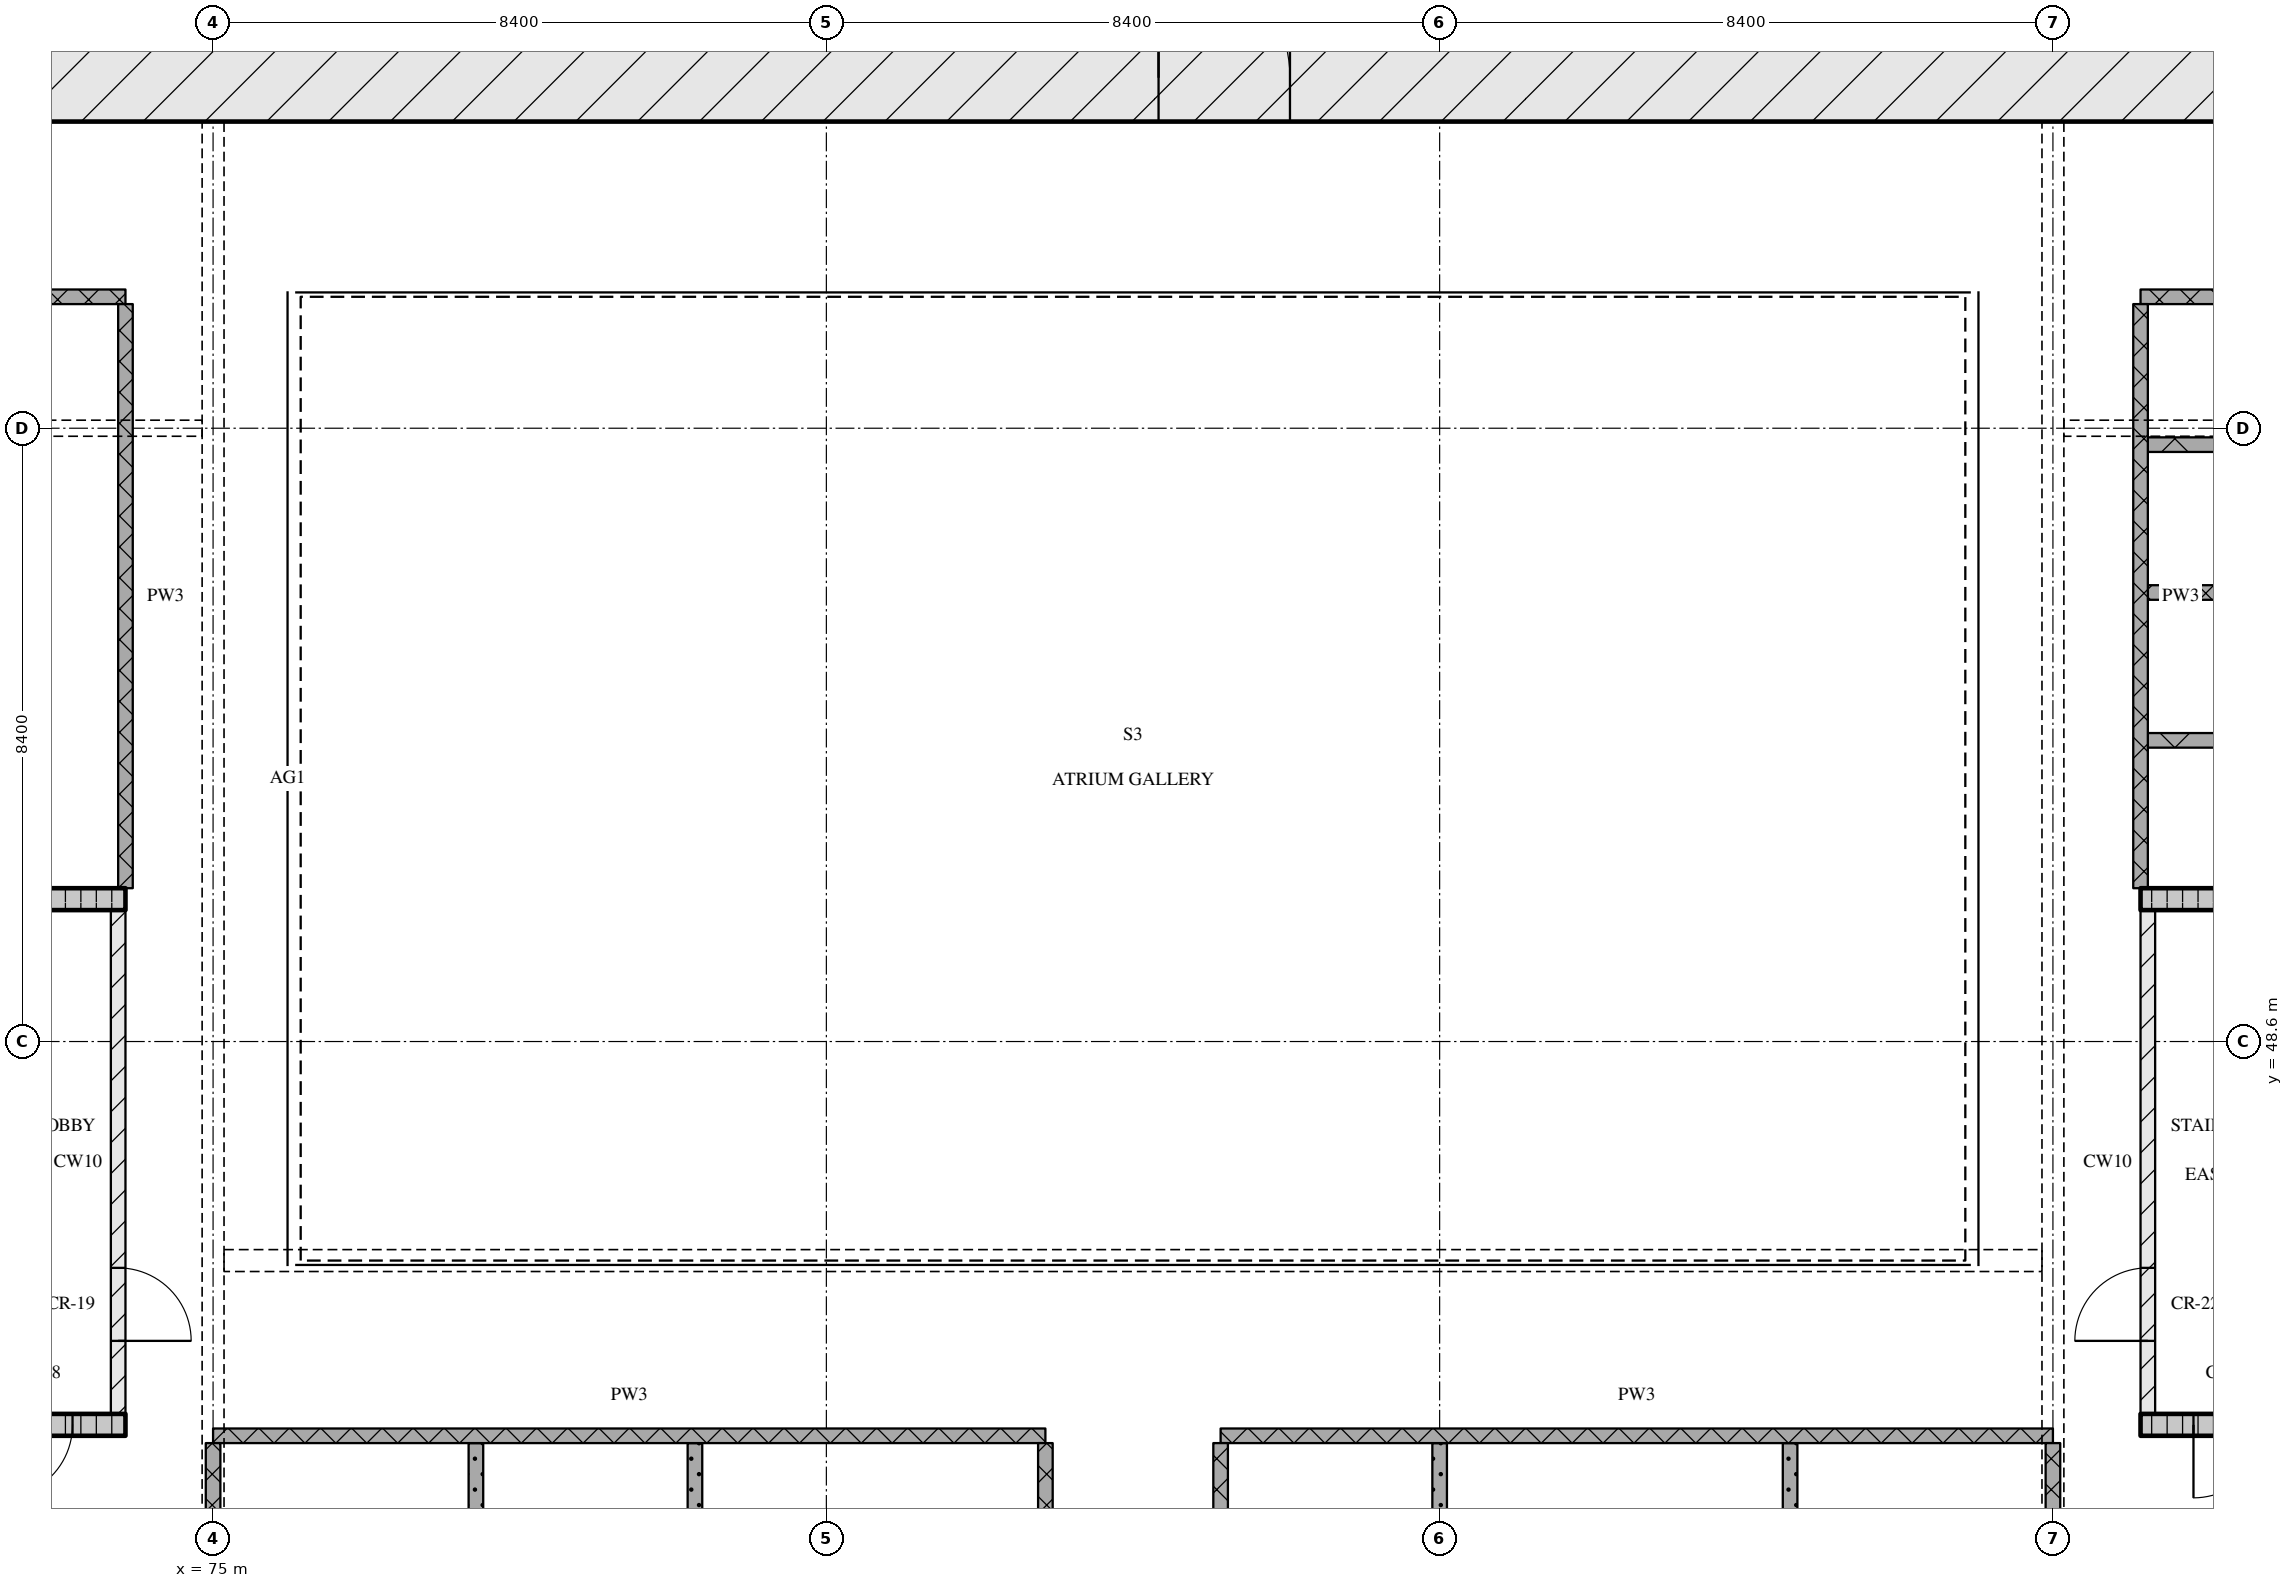
"""IFC4 building model, lengths in metres.
Left out: names, types, materials, properties, quantities, classifications, styles, units other than length and angle.
Written with IfcOpenShell. Run it as: python <this file> out.ifc"""

import sys

from ifc_helpers import new_model, si_unit, direction, frame, frame_2d, origin, place, context, subcontext, project, spatial, rectangle, extrude, element, fill, save


model = new_model("IFC4")
c1 = context("Model", 3, precision=1e-05, world=origin(), true_north=direction((0.0, 1.0)))
c2 = subcontext(c1, "Body", "Model", "MODEL_VIEW")
j1 = project(units=[si_unit("LENGTHUNIT", "METRE"), si_unit("PLANEANGLEUNIT", "RADIAN")], contexts=[c1])
p1 = place(None, origin())
s1 = spatial("IfcSite", under=j1, at=p1, CompositionType="ELEMENT")
p2 = place(p1, origin())
s2 = spatial("IfcBuilding", under=s1, at=p2, CompositionType="ELEMENT")
p3 = place(p2, frame((0.0, 0.0, 32.7)))
s3 = spatial("IfcBuildingStorey", under=s2, at=p3, CompositionType="ELEMENT", Elevation=32.7)
p4 = place(p3, frame((66.6, 61.8, 0.0), z_axis=(0.0, 0.0, 1.0), x_axis=(1.0, 0.0, 0.0)))
e1 = element("IfcWall", 1, at=p4, inside=s3, PredefinedType="SOLIDWALL", context=c2, shape_type="SweptSolid", body=[
    extrude(rectangle(XDim=42.0, YDim=1.2, at=frame_2d((21.0, 0.0))), origin(), (0.0, 0.0, 1.0), 4.22),
])
p5 = place(p4, frame((21.35, 0.0, 0.0)))
e2 = element("IfcOpeningElement", 2, at=p5, cuts=e1, PredefinedType="OPENING", context=c2, shape_type="SweptSolid", body=[
    extrude(rectangle(XDim=1.8, YDim=2.1, at=frame_2d((0.9, 1.05))), frame((0.0, 0.61, 0.0), z_axis=(0.0, -1.0, 0.0), x_axis=(1.0, 0.0, 0.0)), (0.0, 0.0, 1.0), 1.22),
])
p6 = place(p3, frame((68.2, 43.35, 0.0), z_axis=(0.0, 0.0, 1.0), x_axis=(1.0, 0.0, 0.0)))
e3 = element("IfcWall", 3, at=p6, inside=s3, PredefinedType="SOLIDWALL", context=c2, shape_type="SweptSolid", body=[
    extrude(rectangle(XDim=5.6, YDim=0.3, at=frame_2d((2.8, 0.0))), origin(), (0.0, 0.0, 1.0), 4.22),
])
p7 = place(p6, frame((3.875, 0.0, 0.0)))
e4 = element("IfcOpeningElement", 4, at=p7, cuts=e3, PredefinedType="OPENING", context=c2, shape_type="SweptSolid", body=[
    extrude(rectangle(XDim=1.0, YDim=2.1, at=frame_2d((0.5, 1.05))), frame((0.0, 0.16, 0.0), z_axis=(0.0, -1.0, 0.0), x_axis=(1.0, 0.0, 0.0)), (0.0, 0.0, 1.0), 0.32),
])
p8 = place(p3, frame((73.7, 43.5, 0.0), z_axis=(0.0, 0.0, 1.0), x_axis=(0.0, 1.0, 0.0)))
e5 = element("IfcWall", 5, at=p8, inside=s3, PredefinedType="PARTITIONING", context=c2, shape_type="SweptSolid", body=[
    extrude(rectangle(XDim=6.9, YDim=0.2, at=frame_2d((3.45, 0.0))), origin(), (0.0, 0.0, 1.0), 4.22),
])
p9 = place(p8, frame((1.0, 0.0, 0.0)))
e6 = element("IfcOpeningElement", 6, at=p9, cuts=e5, PredefinedType="OPENING", context=c2, shape_type="SweptSolid", body=[
    extrude(rectangle(XDim=1.0, YDim=2.1, at=frame_2d((0.5, 1.05))), frame((0.0, 0.11, 0.0), z_axis=(0.0, -1.0, 0.0), x_axis=(1.0, 0.0, 0.0)), (0.0, 0.0, 1.0), 0.22),
])
p10 = place(p3, frame((68.2, 50.55, 0.0), z_axis=(0.0, 0.0, 1.0), x_axis=(1.0, 0.0, 0.0)))
e7 = element("IfcWall", 7, at=p10, inside=s3, PredefinedType="SOLIDWALL", context=c2, shape_type="SweptSolid", body=[
    extrude(rectangle(XDim=5.6, YDim=0.3, at=frame_2d((2.8, 0.0))), origin(), (0.0, 0.0, 1.0), 4.22),
])
p11 = place(p3, frame((101.4, 43.35, 0.0), z_axis=(0.0, 0.0, 1.0), x_axis=(1.0, 0.0, 0.0)))
e8 = element("IfcWall", 8, at=p11, inside=s3, PredefinedType="SOLIDWALL", context=c2, shape_type="SweptSolid", body=[
    extrude(rectangle(XDim=5.6, YDim=0.3, at=frame_2d((2.8, 0.0))), origin(), (0.0, 0.0, 1.0), 4.22),
])
p12 = place(p11, frame((0.725, 0.0, 0.0)))
e9 = element("IfcOpeningElement", 9, at=p12, cuts=e8, PredefinedType="OPENING", context=c2, shape_type="SweptSolid", body=[
    extrude(rectangle(XDim=1.0, YDim=2.1, at=frame_2d((0.5, 1.05))), frame((0.0, 0.16, 0.0), z_axis=(0.0, -1.0, 0.0), x_axis=(1.0, 0.0, 0.0)), (0.0, 0.0, 1.0), 0.32),
])
p13 = place(p3, frame((101.5, 43.5, 0.0), z_axis=(0.0, 0.0, 1.0), x_axis=(0.0, 1.0, 0.0)))
e10 = element("IfcWall", 10, at=p13, inside=s3, PredefinedType="PARTITIONING", context=c2, shape_type="SweptSolid", body=[
    extrude(rectangle(XDim=6.9, YDim=0.2, at=frame_2d((3.45, 0.0))), origin(), (0.0, 0.0, 1.0), 4.22),
])
p14 = place(p13, frame((1.0, 0.0, 0.0)))
e11 = element("IfcOpeningElement", 11, at=p14, cuts=e10, PredefinedType="OPENING", context=c2, shape_type="SweptSolid", body=[
    extrude(rectangle(XDim=1.0, YDim=2.1, at=frame_2d((0.5, 1.05))), frame((0.0, 0.11, 0.0), z_axis=(0.0, -1.0, 0.0), x_axis=(1.0, 0.0, 0.0)), (0.0, 0.0, 1.0), 0.22),
])
p15 = place(p3, frame((101.4, 50.55, 0.0), z_axis=(0.0, 0.0, 1.0), x_axis=(1.0, 0.0, 0.0)))
e12 = element("IfcWall", 12, at=p15, inside=s3, PredefinedType="SOLIDWALL", context=c2, shape_type="SweptSolid", body=[
    extrude(rectangle(XDim=5.6, YDim=0.3, at=frame_2d((2.8, 0.0))), origin(), (0.0, 0.0, 1.0), 4.22),
])
for number, where, z_axis, x_axis in (
    (13, (75.0, 43.2, 0.0), (0.0, 0.0, 1.0), (1.0, 0.0, 0.0)),
    (14, (88.8, 43.2, 0.0), (0.0, 0.0, 1.0), (1.0, 0.0, 0.0)),
):
    element("IfcWall", number, at=place(p3, frame(where, z_axis=z_axis, x_axis=x_axis)), inside=s3, PredefinedType="PARTITIONING", context=c2, shape_type="SweptSolid", body=[
        extrude(rectangle(XDim=11.4, YDim=0.2, at=frame_2d((5.7, 0.0))), origin(), (0.0, 0.0, 1.0), 4.22),
    ])
for number, where, z_axis, x_axis in (
    (15, (101.5, 52.725, 0.0), (0.0, 0.0, 1.0), (1.0, 0.0, 0.0)),
    (16, (101.5, 54.75, 0.0), (0.0, 0.0, 1.0), (1.0, 0.0, 0.0)),
):
    element("IfcWall", number, at=place(p3, frame(where, z_axis=z_axis, x_axis=x_axis)), inside=s3, PredefinedType="PARTITIONING", context=c2, shape_type="SweptSolid", body=[
        extrude(rectangle(XDim=10.6, YDim=0.2, at=frame_2d((5.3, 0.0))), origin(), (0.0, 0.0, 1.0), 4.22),
    ])
p16 = place(p3, frame((101.5, 56.775, 0.0), z_axis=(0.0, 0.0, 1.0), x_axis=(1.0, 0.0, 0.0)))
e17 = element("IfcWall", 17, at=p16, inside=s3, PredefinedType="PARTITIONING", context=c2, shape_type="SweptSolid", body=[
    extrude(rectangle(XDim=6.63, YDim=0.2, at=frame_2d((3.315, 0.0))), origin(), (0.0, 0.0, 1.0), 4.22),
])
p17 = place(p3, frame((73.8, 58.8, 0.0), z_axis=(0.0, 0.0, 1.0), x_axis=(-1.0, 0.0, 0.0)))
e18 = element("IfcWall", 18, at=p17, inside=s3, PredefinedType="PARTITIONING", context=c2, shape_type="SweptSolid", body=[
    extrude(rectangle(XDim=10.8, YDim=0.2, at=frame_2d((5.4, 0.0))), origin(), (0.0, 0.0, 1.0), 4.22),
])
p18 = place(p17, frame((4.95, 0.0, 0.0)))
e19 = element("IfcOpeningElement", 19, at=p18, cuts=e18, PredefinedType="OPENING", context=c2, shape_type="SweptSolid", body=[
    extrude(rectangle(XDim=0.9, YDim=2.1, at=frame_2d((0.45, 1.05))), frame((0.0, 0.11, 0.0), z_axis=(0.0, -1.0, 0.0), x_axis=(1.0, 0.0, 0.0)), (0.0, 0.0, 1.0), 0.22),
])
p19 = place(p3, frame((101.4, 58.8, 0.0), z_axis=(0.0, 0.0, 1.0), x_axis=(1.0, 0.0, 0.0)))
e20 = element("IfcWall", 20, at=p19, inside=s3, PredefinedType="PARTITIONING", context=c2, shape_type="SweptSolid", body=[
    extrude(rectangle(XDim=10.8, YDim=0.2, at=frame_2d((5.4, 0.0))), origin(), (0.0, 0.0, 1.0), 4.22),
])
p20 = place(p3, frame((73.8, 58.7, 0.0), z_axis=(0.0, 0.0, 1.0), x_axis=(0.0, -1.0, 0.0)))
e21 = element("IfcWall", 21, at=p20, inside=s3, PredefinedType="PARTITIONING", context=c2, shape_type="SweptSolid", body=[
    extrude(rectangle(XDim=8.0, YDim=0.2, at=frame_2d((4.0, 0.0))), origin(), (0.0, 0.0, 1.0), 4.22),
])
p21 = place(p3, frame((75.0, 43.1, 0.0), z_axis=(0.0, 0.0, 1.0), x_axis=(0.0, -1.0, 0.0)))
e22 = element("IfcWall", 22, at=p21, inside=s3, PredefinedType="PARTITIONING", context=c2, shape_type="SweptSolid", body=[
    extrude(rectangle(XDim=2.2, YDim=0.2, at=frame_2d((1.1, 0.0))), origin(), (0.0, 0.0, 1.0), 3.33),
])
for number, where, z_axis, x_axis in (
    (23, (78.6, 43.1, 0.0), (0.0, 0.0, 1.0), (0.0, -1.0, 0.0)),
    (24, (81.6, 43.1, 0.0), (0.0, 0.0, 1.0), (0.0, -1.0, 0.0)),
    (25, (86.4, 43.1, 0.0), (0.0, 0.0, 1.0), (0.0, -1.0, 0.0)),
):
    element("IfcWall", number, at=place(p3, frame(where, z_axis=z_axis, x_axis=x_axis)), inside=s3, PredefinedType="PARTITIONING", context=c2, shape_type="SweptSolid", body=[
        extrude(rectangle(XDim=4.6, YDim=0.2, at=frame_2d((2.3, 0.0))), origin(), (0.0, 0.0, 1.0), 4.22),
    ])
p22 = place(p3, frame((88.8, 43.1, 0.0), z_axis=(0.0, 0.0, 1.0), x_axis=(0.0, -1.0, 0.0)))
e26 = element("IfcWall", 26, at=p22, inside=s3, PredefinedType="PARTITIONING", context=c2, shape_type="SweptSolid", body=[
    extrude(rectangle(XDim=4.6, YDim=0.2, at=frame_2d((2.3, 0.0))), origin(), (0.0, 0.0, 1.0), 4.22),
])
p23 = place(p22, frame((1.85, 0.0, 0.0)))
e27 = element("IfcOpeningElement", 27, at=p23, cuts=e26, PredefinedType="OPENING", context=c2, shape_type="SweptSolid", body=[
    extrude(rectangle(XDim=0.9, YDim=2.1, at=frame_2d((0.45, 1.05))), frame((0.0, 0.11, 0.0), z_axis=(0.0, -1.0, 0.0), x_axis=(1.0, 0.0, 0.0)), (0.0, 0.0, 1.0), 0.22),
])
p24 = place(p3, frame((91.8, 43.1, 0.0), z_axis=(0.0, 0.0, 1.0), x_axis=(0.0, -1.0, 0.0)))
e28 = element("IfcWall", 28, at=p24, inside=s3, PredefinedType="PARTITIONING", context=c2, shape_type="SweptSolid", body=[
    extrude(rectangle(XDim=2.43, YDim=0.2, at=frame_2d((1.215, 0.0))), origin(), (0.0, 0.0, 1.0), 4.22),
])
p25 = place(p3, frame((96.6, 43.1, 0.0), z_axis=(0.0, 0.0, 1.0), x_axis=(0.0, -1.0, 0.0)))
e29 = element("IfcWall", 29, at=p25, inside=s3, PredefinedType="PARTITIONING", context=c2, shape_type="SweptSolid", body=[
    extrude(rectangle(XDim=4.6, YDim=0.2, at=frame_2d((2.3, 0.0))), origin(), (0.0, 0.0, 1.0), 4.22),
])
p26 = place(p3, frame((100.2, 43.1, 0.0), z_axis=(0.0, 0.0, 1.0), x_axis=(0.0, -1.0, 0.0)))
e30 = element("IfcWall", 30, at=p26, inside=s3, PredefinedType="PARTITIONING", context=c2, shape_type="SweptSolid", body=[
    extrude(rectangle(XDim=2.2, YDim=0.2, at=frame_2d((1.1, 0.0))), origin(), (0.0, 0.0, 1.0), 3.33),
])
p27 = place(p3, frame((101.4, 58.7, 0.0), z_axis=(0.0, 0.0, 1.0), x_axis=(0.0, -1.0, 0.0)))
e31 = element("IfcWall", 31, at=p27, inside=s3, PredefinedType="PARTITIONING", context=c2, shape_type="SweptSolid", body=[
    extrude(rectangle(XDim=8.0, YDim=0.2, at=frame_2d((4.0, 0.0))), origin(), (0.0, 0.0, 1.0), 4.22),
])
p28 = place(p5, origin())
e32 = element("IfcDoor", 32, at=p28, inside=s3, OperationType="DOUBLE_DOOR_SINGLE_SWING", PredefinedType="DOOR", context=c2, shape_type="SweptSolid", body=[
    extrude(rectangle(XDim=1.8, YDim=2.1, at=frame_2d((0.9, 1.05))), frame((0.0, 0.025, 0.0), z_axis=(0.0, -1.0, 0.0), x_axis=(1.0, 0.0, 0.0)), (0.0, 0.0, 1.0), 0.05),
])
fill(e2, e32)
p29 = place(p7, origin())
e33 = element("IfcDoor", 33, at=p29, inside=s3, OperationType="SINGLE_SWING_RIGHT", PredefinedType="DOOR", context=c2, shape_type="SweptSolid", body=[
    extrude(rectangle(XDim=1.0, YDim=2.1, at=frame_2d((0.5, 1.05))), frame((0.0, 0.025, 0.0), z_axis=(0.0, -1.0, 0.0), x_axis=(1.0, 0.0, 0.0)), (0.0, 0.0, 1.0), 0.05),
])
fill(e4, e33)
p30 = place(p9, origin())
e34 = element("IfcDoor", 34, at=p30, inside=s3, OperationType="SINGLE_SWING_RIGHT", PredefinedType="DOOR", context=c2, shape_type="SweptSolid", body=[
    extrude(rectangle(XDim=1.0, YDim=2.1, at=frame_2d((0.5, 1.05))), frame((0.0, 0.025, 0.0), z_axis=(0.0, -1.0, 0.0), x_axis=(1.0, 0.0, 0.0)), (0.0, 0.0, 1.0), 0.05),
])
fill(e6, e34)
p31 = place(p12, origin())
e35 = element("IfcDoor", 35, at=p31, inside=s3, OperationType="SINGLE_SWING_RIGHT", PredefinedType="DOOR", context=c2, shape_type="SweptSolid", body=[
    extrude(rectangle(XDim=1.0, YDim=2.1, at=frame_2d((0.5, 1.05))), frame((0.0, 0.025, 0.0), z_axis=(0.0, -1.0, 0.0), x_axis=(1.0, 0.0, 0.0)), (0.0, 0.0, 1.0), 0.05),
])
fill(e9, e35)
p32 = place(p14, origin())
e36 = element("IfcDoor", 36, at=p32, inside=s3, OperationType="SINGLE_SWING_LEFT", PredefinedType="DOOR", context=c2, shape_type="SweptSolid", body=[
    extrude(rectangle(XDim=1.0, YDim=2.1, at=frame_2d((0.5, 1.05))), frame((0.0, 0.025, 0.0), z_axis=(0.0, -1.0, 0.0), x_axis=(1.0, 0.0, 0.0)), (0.0, 0.0, 1.0), 0.05),
])
fill(e11, e36)
save(model, sys.argv[1])
